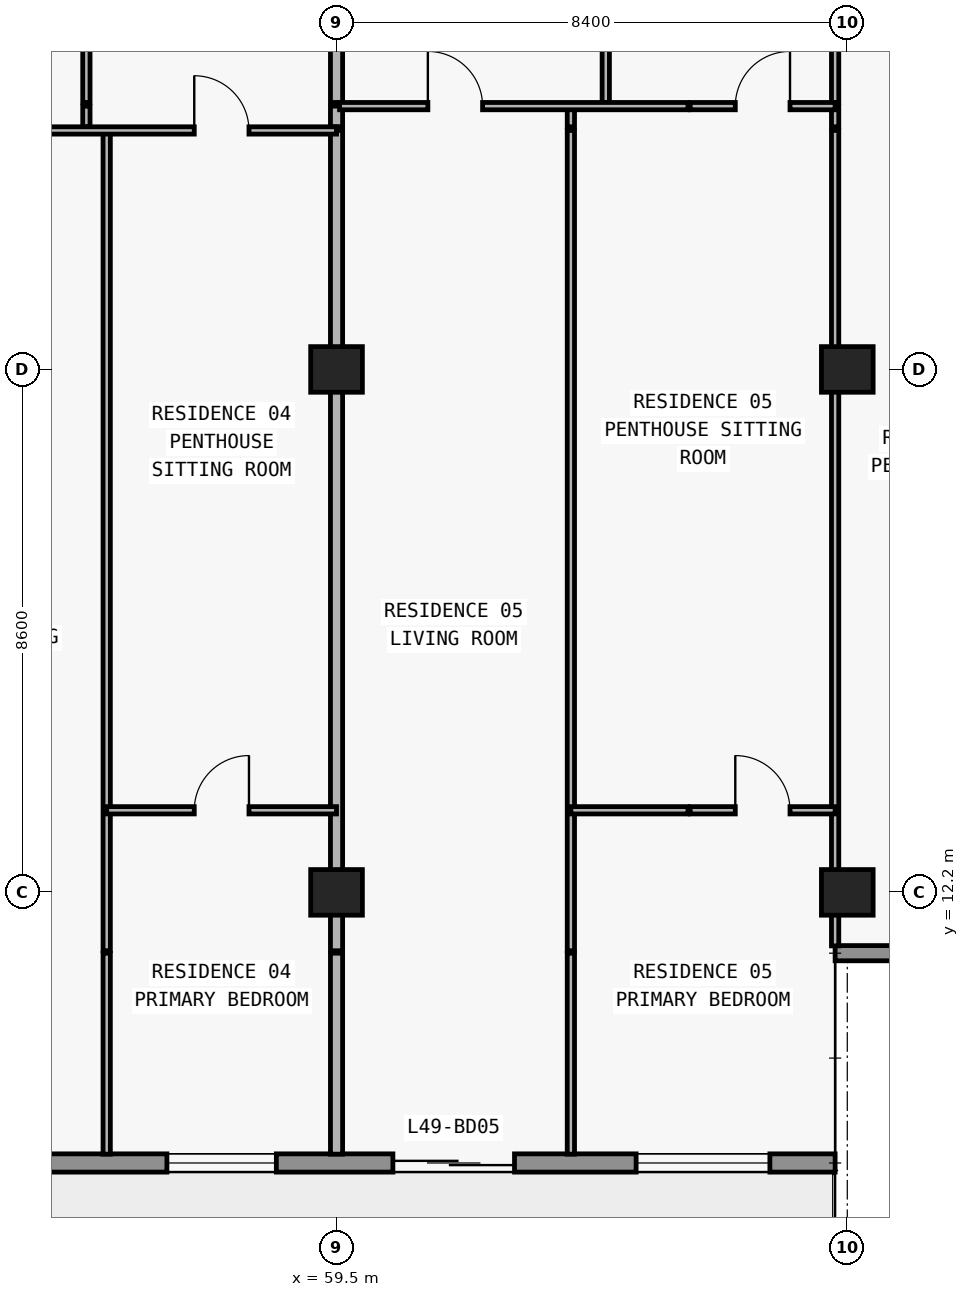
"""IFC4 building model, lengths in metres.
Left out: names, types, materials, properties, quantities, classifications, styles, units other than length and angle.
Written with IfcOpenShell. Run it as: python <this file> out.ifc"""

import sys

from ifc_helpers import new_model, si_unit, direction, frame, frame_2d, origin, origin_2d, place, context, subcontext, project, spatial, rectangle, extrude, element, fill, save


model = new_model("IFC4")
c1 = context("Model", 3, precision=1e-05, world=origin(), true_north=direction((0.0, 1.0)))
c2 = subcontext(c1, "Body", "Model", "MODEL_VIEW")
j1 = project(units=[si_unit("LENGTHUNIT", "METRE"), si_unit("PLANEANGLEUNIT", "RADIAN")], contexts=[c1])
p1 = place(None, origin())
s1 = spatial("IfcSite", under=j1, at=p1, CompositionType="ELEMENT")
p2 = place(p1, origin())
s2 = spatial("IfcBuilding", under=s1, at=p2, CompositionType="ELEMENT")
p3 = place(p2, frame((0.0, 0.0, 177.0)))
s3 = spatial("IfcBuildingStorey", under=s2, at=p3, CompositionType="ELEMENT", Elevation=177.0)
for number, where, z_axis, x_axis in (
    (1, (59.5, 12.2, 0.0), (0.0, 0.0, 1.0), (1.0, 0.0, 0.0)),
    (2, (67.9, 12.2, 0.0), (0.0, 0.0, 1.0), (1.0, 0.0, 0.0)),
    (3, (59.5, 20.8, 0.0), (0.0, 0.0, 1.0), (1.0, 0.0, 0.0)),
    (4, (67.9, 20.8, 0.0), (0.0, 0.0, 1.0), (1.0, 0.0, 0.0)),
):
    element("IfcColumn", number, at=place(p3, frame(where, z_axis=z_axis, x_axis=x_axis)), inside=s3, PredefinedType="COLUMN", context=c2, shape_type="SweptSolid", body=[
        extrude(rectangle(XDim=0.85, YDim=0.75, at=origin_2d()), origin(), (0.0, 0.0, 1.0), 3.05),
    ])
p4 = place(p3, frame((67.7, 7.75, 0.0), z_axis=(0.0, 0.0, 1.0), x_axis=(-1.0, 0.0, 0.0)))
e5 = element("IfcWall", 5, at=p4, inside=s3, PredefinedType="STANDARD", context=c2, shape_type="SweptSolid", body=[
    extrude(rectangle(XDim=57.6, YDim=0.3, at=frame_2d((28.8, 0.0))), origin(), (0.0, 0.0, 1.0), 3.05),
])
p5 = place(p4, frame((54.673, 0.0, 0.0)))
e6 = element("IfcOpeningElement", 6, at=p5, cuts=e5, PredefinedType="OPENING", context=c2, shape_type="SweptSolid", body=[
    extrude(rectangle(XDim=2.0, YDim=2.3, at=frame_2d((1.0, 1.15))), frame((0.0, 0.16, 0.0), z_axis=(0.0, -1.0, 0.0), x_axis=(1.0, 0.0, 0.0)), (0.0, 0.0, 1.0), 0.32),
])
p6 = place(p4, frame((50.473, 0.0, 0.85)))
e7 = element("IfcOpeningElement", 7, at=p6, cuts=e5, PredefinedType="OPENING", context=c2, shape_type="SweptSolid", body=[
    extrude(rectangle(XDim=2.2, YDim=1.55, at=frame_2d((1.1, 0.775))), frame((0.0, 0.16, 0.0), z_axis=(0.0, -1.0, 0.0), x_axis=(1.0, 0.0, 0.0)), (0.0, 0.0, 1.0), 0.32),
])
p7 = place(p4, frame((46.09, 0.0, 0.0)))
e8 = element("IfcOpeningElement", 8, at=p7, cuts=e5, PredefinedType="OPENING", context=c2, shape_type="SweptSolid", body=[
    extrude(rectangle(XDim=2.0, YDim=2.3, at=frame_2d((1.0, 1.15))), frame((0.0, 0.16, 0.0), z_axis=(0.0, -1.0, 0.0), x_axis=(1.0, 0.0, 0.0)), (0.0, 0.0, 1.0), 0.32),
])
p8 = place(p4, frame((41.99, 0.0, 0.85)))
e9 = element("IfcOpeningElement", 9, at=p8, cuts=e5, PredefinedType="OPENING", context=c2, shape_type="SweptSolid", body=[
    extrude(rectangle(XDim=1.8, YDim=1.55, at=frame_2d((0.9, 0.775))), frame((0.0, 0.16, 0.0), z_axis=(0.0, -1.0, 0.0), x_axis=(1.0, 0.0, 0.0)), (0.0, 0.0, 1.0), 0.32),
])
p9 = place(p4, frame((38.09, 0.0, 0.0)))
e10 = element("IfcOpeningElement", 10, at=p9, cuts=e5, PredefinedType="OPENING", context=c2, shape_type="SweptSolid", body=[
    extrude(rectangle(XDim=2.0, YDim=2.3, at=frame_2d((1.0, 1.15))), frame((0.0, 0.16, 0.0), z_axis=(0.0, -1.0, 0.0), x_axis=(1.0, 0.0, 0.0)), (0.0, 0.0, 1.0), 0.32),
])
p10 = place(p4, frame((33.41, 0.0, 0.65)))
e11 = element("IfcOpeningElement", 11, at=p10, cuts=e5, PredefinedType="OPENING", context=c2, shape_type="SweptSolid", body=[
    extrude(rectangle(XDim=2.6, YDim=1.85, at=frame_2d((1.3, 0.925))), frame((0.0, 0.16, 0.0), z_axis=(0.0, -1.0, 0.0), x_axis=(1.0, 0.0, 0.0)), (0.0, 0.0, 1.0), 0.32),
])
p11 = place(p4, frame((27.7, 0.0, 0.85)))
e12 = element("IfcOpeningElement", 12, at=p11, cuts=e5, PredefinedType="OPENING", context=c2, shape_type="SweptSolid", body=[
    extrude(rectangle(XDim=2.2, YDim=1.55, at=frame_2d((1.1, 0.775))), frame((0.0, 0.16, 0.0), z_axis=(0.0, -1.0, 0.0), x_axis=(1.0, 0.0, 0.0)), (0.0, 0.0, 1.0), 0.32),
])
p12 = place(p4, frame((19.7, 0.0, 0.85)))
e13 = element("IfcOpeningElement", 13, at=p12, cuts=e5, PredefinedType="OPENING", context=c2, shape_type="SweptSolid", body=[
    extrude(rectangle(XDim=2.2, YDim=1.55, at=frame_2d((1.1, 0.775))), frame((0.0, 0.16, 0.0), z_axis=(0.0, -1.0, 0.0), x_axis=(1.0, 0.0, 0.0)), (0.0, 0.0, 1.0), 0.32),
])
p13 = place(p4, frame((13.29, 0.0, 0.0)))
e14 = element("IfcOpeningElement", 14, at=p13, cuts=e5, PredefinedType="OPENING", context=c2, shape_type="SweptSolid", body=[
    extrude(rectangle(XDim=2.0, YDim=2.3, at=frame_2d((1.0, 1.15))), frame((0.0, 0.16, 0.0), z_axis=(0.0, -1.0, 0.0), x_axis=(1.0, 0.0, 0.0)), (0.0, 0.0, 1.0), 0.32),
])
p14 = place(p4, frame((9.19, 0.0, 0.85)))
e15 = element("IfcOpeningElement", 15, at=p14, cuts=e5, PredefinedType="OPENING", context=c2, shape_type="SweptSolid", body=[
    extrude(rectangle(XDim=1.8, YDim=1.55, at=frame_2d((0.9, 0.775))), frame((0.0, 0.16, 0.0), z_axis=(0.0, -1.0, 0.0), x_axis=(1.0, 0.0, 0.0)), (0.0, 0.0, 1.0), 0.32),
])
p15 = place(p4, frame((5.273, 0.0, 0.0)))
e16 = element("IfcOpeningElement", 16, at=p15, cuts=e5, PredefinedType="OPENING", context=c2, shape_type="SweptSolid", body=[
    extrude(rectangle(XDim=2.0, YDim=2.3, at=frame_2d((1.0, 1.15))), frame((0.0, 0.16, 0.0), z_axis=(0.0, -1.0, 0.0), x_axis=(1.0, 0.0, 0.0)), (0.0, 0.0, 1.0), 0.32),
])
p16 = place(p4, frame((1.073, 0.0, 0.85)))
e17 = element("IfcOpeningElement", 17, at=p16, cuts=e5, PredefinedType="OPENING", context=c2, shape_type="SweptSolid", body=[
    extrude(rectangle(XDim=2.2, YDim=1.55, at=frame_2d((1.1, 0.775))), frame((0.0, 0.16, 0.0), z_axis=(0.0, -1.0, 0.0), x_axis=(1.0, 0.0, 0.0)), (0.0, 0.0, 1.0), 0.32),
])
p17 = place(p3, frame((67.7, 11.2, 0.0), z_axis=(0.0, 0.0, 1.0), x_axis=(1.0, 0.0, 0.0)))
e18 = element("IfcWall", 18, at=p17, inside=s3, PredefinedType="ELEMENTEDWALL", context=c2, shape_type="SweptSolid", body=[
    extrude(rectangle(XDim=3.85, YDim=0.25, at=frame_2d((1.925, 0.0))), origin(), (0.0, 0.0, 1.0), 3.05),
])
p18 = place(p3, frame((55.386, 24.79, 0.0), z_axis=(0.0, 0.0, 1.0), x_axis=(0.0, 1.0, 0.0)))
e19 = element("IfcWall", 19, at=p18, inside=s3, PredefinedType="PARTITIONING", context=c2, shape_type="SweptSolid", body=[
    extrude(rectangle(XDim=0.34, YDim=0.12, at=frame_2d((0.17, 0.0))), origin(), (0.0, 0.0, 1.0), 2.499),
])
p19 = place(p3, frame((55.386, 25.19, 0.0), z_axis=(0.0, 0.0, 1.0), x_axis=(0.0, 1.0, 0.0)))
e20 = element("IfcWall", 20, at=p19, inside=s3, PredefinedType="PARTITIONING", context=c2, shape_type="SweptSolid", body=[
    extrude(rectangle(XDim=4.69, YDim=0.12, at=frame_2d((2.345, 0.0))), origin(), (0.0, 0.0, 1.0), 2.499),
])
p20 = place(p19, frame((1.895, 0.0, 0.0)))
e21 = element("IfcOpeningElement", 21, at=p20, cuts=e20, PredefinedType="OPENING", context=c2, shape_type="SweptSolid", body=[
    extrude(rectangle(XDim=0.9, YDim=2.15, at=frame_2d((0.45, 1.075))), frame((0.0, 0.07, 0.0), z_axis=(0.0, -1.0, 0.0), x_axis=(1.0, 0.0, 0.0)), (0.0, 0.0, 1.0), 0.14),
])
p21 = place(p3, frame((55.72, 7.895, 0.0), z_axis=(0.0, 0.0, 1.0), x_axis=(0.0, 1.0, 0.0)))
e22 = element("IfcWall", 22, at=p21, inside=s3, PredefinedType="PARTITIONING", context=c2, shape_type="SweptSolid", body=[
    extrude(rectangle(XDim=3.305, YDim=0.12, at=frame_2d((1.652, 0.0))), origin(), (0.0, 0.0, 1.0), 3.05),
])
p22 = place(p3, frame((55.72, 11.24, 0.0), z_axis=(0.0, 0.0, 1.0), x_axis=(0.0, 1.0, 0.0)))
e23 = element("IfcWall", 23, at=p22, inside=s3, PredefinedType="PARTITIONING", context=c2, shape_type="SweptSolid", body=[
    extrude(rectangle(XDim=13.49, YDim=0.12, at=frame_2d((6.745, 0.0))), origin(), (0.0, 0.0, 1.0), 3.05),
])
p23 = place(p3, frame((59.5, 7.895, 0.0), z_axis=(0.0, 0.0, 1.0), x_axis=(0.0, 1.0, 0.0)))
e24 = element("IfcWall", 24, at=p23, inside=s3, PredefinedType="PARTITIONING", context=c2, shape_type="SweptSolid", body=[
    extrude(rectangle(XDim=3.305, YDim=0.2, at=frame_2d((1.652, 0.0))), origin(), (0.0, 0.0, 1.0), 3.05),
])
p24 = place(p3, frame((59.5, 11.24, 0.0), z_axis=(0.0, 0.0, 1.0), x_axis=(0.0, 1.0, 0.0)))
e25 = element("IfcWall", 25, at=p24, inside=s3, PredefinedType="PARTITIONING", context=c2, shape_type="SweptSolid", body=[
    extrude(rectangle(XDim=13.49, YDim=0.2, at=frame_2d((6.745, 0.0))), origin(), (0.0, 0.0, 1.0), 2.263),
])
p25 = place(p3, frame((59.5, 24.79, 0.0), z_axis=(0.0, 0.0, 1.0), x_axis=(0.0, 1.0, 0.0)))
e26 = element("IfcWall", 26, at=p25, inside=s3, PredefinedType="PARTITIONING", context=c2, shape_type="SweptSolid", body=[
    extrude(rectangle(XDim=0.34, YDim=0.2, at=frame_2d((0.17, 0.0))), origin(), (0.0, 0.0, 1.0), 2.263),
])
p26 = place(p3, frame((59.5, 25.19, 0.0), z_axis=(0.0, 0.0, 1.0), x_axis=(0.0, 1.0, 0.0)))
e27 = element("IfcWall", 27, at=p26, inside=s3, PredefinedType="PARTITIONING", context=c2, shape_type="SweptSolid", body=[
    extrude(rectangle(XDim=4.69, YDim=0.2, at=frame_2d((2.345, 0.0))), origin(), (0.0, 0.0, 1.0), 2.263),
])
p27 = place(p3, frame((63.354, 7.895, 0.0), z_axis=(0.0, 0.0, 1.0), x_axis=(0.0, 1.0, 0.0)))
e28 = element("IfcWall", 28, at=p27, inside=s3, PredefinedType="PARTITIONING", context=c2, shape_type="SweptSolid", body=[
    extrude(rectangle(XDim=3.305, YDim=0.12, at=frame_2d((1.652, 0.0))), origin(), (0.0, 0.0, 1.0), 3.05),
])
p28 = place(p3, frame((63.354, 11.24, 0.0), z_axis=(0.0, 0.0, 1.0), x_axis=(0.0, 1.0, 0.0)))
e29 = element("IfcWall", 29, at=p28, inside=s3, PredefinedType="PARTITIONING", context=c2, shape_type="SweptSolid", body=[
    extrude(rectangle(XDim=13.49, YDim=0.12, at=frame_2d((6.745, 0.0))), origin(), (0.0, 0.0, 1.0), 3.05),
])
p29 = place(p3, frame((63.354, 24.79, 0.0), z_axis=(0.0, 0.0, 1.0), x_axis=(0.0, 1.0, 0.0)))
e30 = element("IfcWall", 30, at=p29, inside=s3, PredefinedType="PARTITIONING", context=c2, shape_type="SweptSolid", body=[
    extrude(rectangle(XDim=0.34, YDim=0.12, at=frame_2d((0.17, 0.0))), origin(), (0.0, 0.0, 1.0), 3.05),
])
p30 = place(p3, frame((63.928, 25.19, 0.0), z_axis=(0.0, 0.0, 1.0), x_axis=(0.0, 1.0, 0.0)))
e31 = element("IfcWall", 31, at=p30, inside=s3, PredefinedType="PARTITIONING", context=c2, shape_type="SweptSolid", body=[
    extrude(rectangle(XDim=4.69, YDim=0.12, at=frame_2d((2.345, 0.0))), origin(), (0.0, 0.0, 1.0), 2.499),
])
p31 = place(p30, frame((1.895, 0.0, 0.0)))
e32 = element("IfcOpeningElement", 32, at=p31, cuts=e31, PredefinedType="OPENING", context=c2, shape_type="SweptSolid", body=[
    extrude(rectangle(XDim=0.9, YDim=2.15, at=frame_2d((0.45, 1.075))), frame((0.0, 0.07, 0.0), z_axis=(0.0, -1.0, 0.0), x_axis=(1.0, 0.0, 0.0)), (0.0, 0.0, 1.0), 0.14),
])
p32 = place(p3, frame((67.7, 11.32, 0.0), z_axis=(0.0, 0.0, 1.0), x_axis=(0.0, 1.0, 0.0)))
e33 = element("IfcWall", 33, at=p32, inside=s3, PredefinedType="PARTITIONING", context=c2, shape_type="SweptSolid", body=[
    extrude(rectangle(XDim=13.41, YDim=0.12, at=frame_2d((6.705, 0.0))), origin(), (0.0, 0.0, 1.0), 2.263),
])
p33 = place(p3, frame((67.7, 24.79, 0.0), z_axis=(0.0, 0.0, 1.0), x_axis=(0.0, 1.0, 0.0)))
e34 = element("IfcWall", 34, at=p33, inside=s3, PredefinedType="PARTITIONING", context=c2, shape_type="SweptSolid", body=[
    extrude(rectangle(XDim=0.34, YDim=0.12, at=frame_2d((0.17, 0.0))), origin(), (0.0, 0.0, 1.0), 2.263),
])
p34 = place(p3, frame((67.7, 25.19, 0.0), z_axis=(0.0, 0.0, 1.0), x_axis=(0.0, 1.0, 0.0)))
e35 = element("IfcWall", 35, at=p34, inside=s3, PredefinedType="PARTITIONING", context=c2, shape_type="SweptSolid", body=[
    extrude(rectangle(XDim=4.69, YDim=0.12, at=frame_2d((2.345, 0.0))), origin(), (0.0, 0.0, 1.0), 2.263),
])
p35 = place(p34, frame((1.895, 0.0, 0.0)))
e36 = element("IfcOpeningElement", 36, at=p35, cuts=e35, PredefinedType="OPENING", context=c2, shape_type="SweptSolid", body=[
    extrude(rectangle(XDim=0.9, YDim=2.15, at=frame_2d((0.45, 1.075))), frame((0.0, 0.07, 0.0), z_axis=(0.0, -1.0, 0.0), x_axis=(1.0, 0.0, 0.0)), (0.0, 0.0, 1.0), 0.14),
])
p36 = place(p3, frame((55.72, 13.55, 0.0), z_axis=(0.0, 0.0, 1.0), x_axis=(1.0, 0.0, 0.0)))
e37 = element("IfcWall", 37, at=p36, inside=s3, PredefinedType="PARTITIONING", context=c2, shape_type="SweptSolid", body=[
    extrude(rectangle(XDim=3.78, YDim=0.12, at=frame_2d((1.89, 0.0))), origin(), (0.0, 0.0, 1.0), 3.05),
])
p37 = place(p36, frame((1.44, 0.0, 0.0)))
e38 = element("IfcOpeningElement", 38, at=p37, cuts=e37, PredefinedType="OPENING", context=c2, shape_type="SweptSolid", body=[
    extrude(rectangle(XDim=0.9, YDim=2.15, at=frame_2d((0.45, 1.075))), frame((0.0, 0.07, 0.0), z_axis=(0.0, -1.0, 0.0), x_axis=(1.0, 0.0, 0.0)), (0.0, 0.0, 1.0), 0.14),
])
p38 = place(p3, frame((63.354, 13.55, 0.0), z_axis=(0.0, 0.0, 1.0), x_axis=(1.0, 0.0, 0.0)))
e39 = element("IfcWall", 39, at=p38, inside=s3, PredefinedType="PARTITIONING", context=c2, shape_type="SweptSolid", body=[
    extrude(rectangle(XDim=1.926, YDim=0.12, at=frame_2d((0.963, 0.0))), origin(), (0.0, 0.0, 1.0), 3.05),
])
p39 = place(p3, frame((65.316, 13.55, 0.0), z_axis=(0.0, 0.0, 1.0), x_axis=(1.0, 0.0, 0.0)))
e40 = element("IfcWall", 40, at=p39, inside=s3, PredefinedType="PARTITIONING", context=c2, shape_type="SweptSolid", body=[
    extrude(rectangle(XDim=2.384, YDim=0.12, at=frame_2d((1.192, 0.0))), origin(), (0.0, 0.0, 1.0), 3.05),
])
p40 = place(p39, frame((0.742, 0.0, 0.0)))
e41 = element("IfcOpeningElement", 41, at=p40, cuts=e40, PredefinedType="OPENING", context=c2, shape_type="SweptSolid", body=[
    extrude(rectangle(XDim=0.9, YDim=2.15, at=frame_2d((0.45, 1.075))), frame((0.0, 0.07, 0.0), z_axis=(0.0, -1.0, 0.0), x_axis=(1.0, 0.0, 0.0)), (0.0, 0.0, 1.0), 0.14),
])
p41 = place(p3, frame((51.32, 24.73, 0.0), z_axis=(0.0, 0.0, 1.0), x_axis=(1.0, 0.0, 0.0)))
e42 = element("IfcWall", 42, at=p41, inside=s3, PredefinedType="PARTITIONING", context=c2, shape_type="SweptSolid", body=[
    extrude(rectangle(XDim=8.18, YDim=0.12, at=frame_2d((4.09, 0.0))), origin(), (0.0, 0.0, 1.0), 3.05),
])
p42 = place(p41, frame((1.583, 0.0, 0.0)))
e43 = element("IfcOpeningElement", 43, at=p42, cuts=e42, PredefinedType="OPENING", context=c2, shape_type="SweptSolid", body=[
    extrude(rectangle(XDim=0.9, YDim=2.15, at=frame_2d((0.45, 1.075))), frame((0.0, 0.07, 0.0), z_axis=(0.0, -1.0, 0.0), x_axis=(1.0, 0.0, 0.0)), (0.0, 0.0, 1.0), 0.14),
])
p43 = place(p41, frame((5.84, 0.0, 0.0)))
e44 = element("IfcOpeningElement", 44, at=p43, cuts=e42, PredefinedType="OPENING", context=c2, shape_type="SweptSolid", body=[
    extrude(rectangle(XDim=0.9, YDim=2.15, at=frame_2d((0.45, 1.075))), frame((0.0, 0.07, 0.0), z_axis=(0.0, -1.0, 0.0), x_axis=(1.0, 0.0, 0.0)), (0.0, 0.0, 1.0), 0.14),
])
p44 = place(p3, frame((59.55, 25.13, 0.0), z_axis=(0.0, 0.0, 1.0), x_axis=(1.0, 0.0, 0.0)))
e45 = element("IfcWall", 45, at=p44, inside=s3, PredefinedType="PARTITIONING", context=c2, shape_type="SweptSolid", body=[
    extrude(rectangle(XDim=5.73, YDim=0.12, at=frame_2d((2.865, 0.0))), origin(), (0.0, 0.0, 1.0), 3.05),
])
p45 = place(p44, frame((1.452, 0.0, 0.0)))
e46 = element("IfcOpeningElement", 46, at=p45, cuts=e45, PredefinedType="OPENING", context=c2, shape_type="SweptSolid", body=[
    extrude(rectangle(XDim=0.9, YDim=2.15, at=frame_2d((0.45, 1.075))), frame((0.0, 0.07, 0.0), z_axis=(0.0, -1.0, 0.0), x_axis=(1.0, 0.0, 0.0)), (0.0, 0.0, 1.0), 0.14),
])
p46 = place(p3, frame((65.316, 25.13, 0.0), z_axis=(0.0, 0.0, 1.0), x_axis=(1.0, 0.0, 0.0)))
e47 = element("IfcWall", 47, at=p46, inside=s3, PredefinedType="PARTITIONING", context=c2, shape_type="SweptSolid", body=[
    extrude(rectangle(XDim=2.384, YDim=0.12, at=frame_2d((1.192, 0.0))), origin(), (0.0, 0.0, 1.0), 3.05),
])
p47 = place(p46, frame((0.742, 0.0, 0.0)))
e48 = element("IfcOpeningElement", 48, at=p47, cuts=e47, PredefinedType="OPENING", context=c2, shape_type="SweptSolid", body=[
    extrude(rectangle(XDim=0.9, YDim=2.15, at=frame_2d((0.45, 1.075))), frame((0.0, 0.07, 0.0), z_axis=(0.0, -1.0, 0.0), x_axis=(1.0, 0.0, 0.0)), (0.0, 0.0, 1.0), 0.14),
])
p48 = place(p14, origin())
e49 = element("IfcWindow", 49, at=p48, inside=s3, PartitioningType="SINGLE_PANEL", PredefinedType="WINDOW", context=c2, shape_type="SweptSolid", body=[
    extrude(rectangle(XDim=1.8, YDim=1.55, at=frame_2d((0.9, 0.775))), frame((0.0, 0.03, 0.0), z_axis=(0.0, -1.0, 0.0), x_axis=(1.0, 0.0, 0.0)), (0.0, 0.0, 1.0), 0.06),
])
fill(e15, e49)
p49 = place(p15, origin())
e50 = element("IfcDoor", 50, at=p49, inside=s3, OperationType="DOUBLE_DOOR_SLIDING", PredefinedType="DOOR", context=c2, shape_type="SweptSolid", body=[
    extrude(rectangle(XDim=2.0, YDim=2.3, at=frame_2d((1.0, 1.15))), frame((0.0, 0.025, 0.0), z_axis=(0.0, -1.0, 0.0), x_axis=(1.0, 0.0, 0.0)), (0.0, 0.0, 1.0), 0.05),
])
fill(e16, e50)
p50 = place(p16, origin())
e51 = element("IfcWindow", 51, at=p50, inside=s3, PartitioningType="SINGLE_PANEL", PredefinedType="WINDOW", context=c2, shape_type="SweptSolid", body=[
    extrude(rectangle(XDim=2.2, YDim=1.55, at=frame_2d((1.1, 0.775))), frame((0.0, 0.03, 0.0), z_axis=(0.0, -1.0, 0.0), x_axis=(1.0, 0.0, 0.0)), (0.0, 0.0, 1.0), 0.06),
])
fill(e17, e51)
p51 = place(p43, origin())
e52 = element("IfcDoor", 52, at=p51, inside=s3, OperationType="SINGLE_SWING_LEFT", PredefinedType="DOOR", context=c2, shape_type="SweptSolid", body=[
    extrude(rectangle(XDim=0.9, YDim=2.15, at=frame_2d((0.45, 1.075))), frame((0.0, 0.025, 0.0), z_axis=(0.0, -1.0, 0.0), x_axis=(1.0, 0.0, 0.0)), (0.0, 0.0, 1.0), 0.05),
])
fill(e44, e52)
p52 = place(p37, origin())
e53 = element("IfcDoor", 53, at=p52, inside=s3, OperationType="SINGLE_SWING_RIGHT", PredefinedType="DOOR", context=c2, shape_type="SweptSolid", body=[
    extrude(rectangle(XDim=0.9, YDim=2.15, at=frame_2d((0.45, 1.075))), frame((0.0, 0.025, 0.0), z_axis=(0.0, -1.0, 0.0), x_axis=(1.0, 0.0, 0.0)), (0.0, 0.0, 1.0), 0.05),
])
fill(e38, e53)
p53 = place(p45, origin())
e54 = element("IfcDoor", 54, at=p53, inside=s3, OperationType="SINGLE_SWING_LEFT", PredefinedType="DOOR", context=c2, shape_type="SweptSolid", body=[
    extrude(rectangle(XDim=0.9, YDim=2.15, at=frame_2d((0.45, 1.075))), frame((0.0, 0.025, 0.0), z_axis=(0.0, -1.0, 0.0), x_axis=(1.0, 0.0, 0.0)), (0.0, 0.0, 1.0), 0.05),
])
fill(e46, e54)
p54 = place(p47, origin())
e55 = element("IfcDoor", 55, at=p54, inside=s3, OperationType="SINGLE_SWING_RIGHT", PredefinedType="DOOR", context=c2, shape_type="SweptSolid", body=[
    extrude(rectangle(XDim=0.9, YDim=2.15, at=frame_2d((0.45, 1.075))), frame((0.0, 0.025, 0.0), z_axis=(0.0, -1.0, 0.0), x_axis=(1.0, 0.0, 0.0)), (0.0, 0.0, 1.0), 0.05),
])
fill(e48, e55)
p55 = place(p40, origin())
e56 = element("IfcDoor", 56, at=p55, inside=s3, OperationType="SINGLE_SWING_LEFT", PredefinedType="DOOR", context=c2, shape_type="SweptSolid", body=[
    extrude(rectangle(XDim=0.9, YDim=2.15, at=frame_2d((0.45, 1.075))), frame((0.0, 0.025, 0.0), z_axis=(0.0, -1.0, 0.0), x_axis=(1.0, 0.0, 0.0)), (0.0, 0.0, 1.0), 0.05),
])
fill(e41, e56)
save(model, sys.argv[1])
